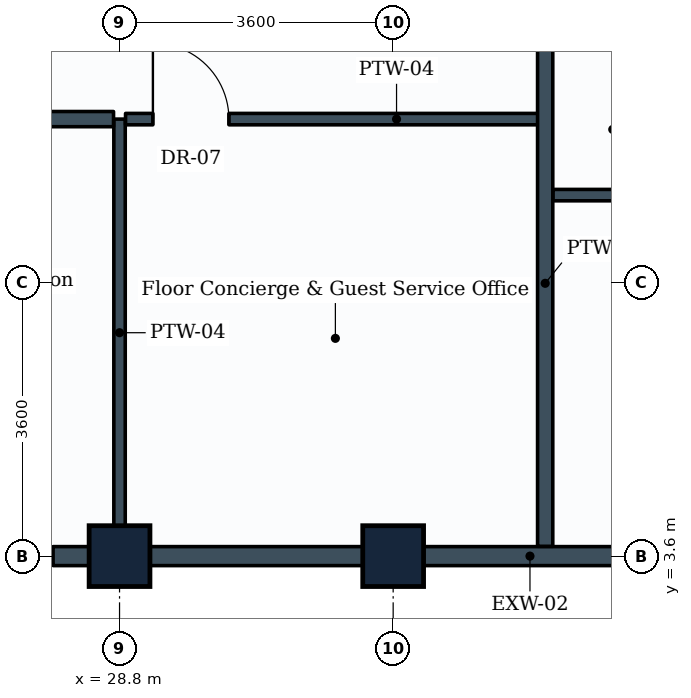
"""IFC4 building model, lengths in metres.
Left out: names, types, materials, properties, quantities, classifications, styles, units other than length and angle.
Written with IfcOpenShell. Run it as: python <this file> out.ifc"""

import sys

from ifc_helpers import new_model, si_unit, direction, frame, frame_2d, origin, origin_2d, place, context, subcontext, project, spatial, rectangle, extrude, element, fill, save


model = new_model("IFC4")
c1 = context("Model", 3, precision=1e-05, world=origin(), true_north=direction((0.0, 1.0)))
c2 = subcontext(c1, "Body", "Model", "MODEL_VIEW")
j1 = project(units=[si_unit("LENGTHUNIT", "METRE"), si_unit("PLANEANGLEUNIT", "RADIAN")], contexts=[c1])
p1 = place(None, origin())
s1 = spatial("IfcSite", under=j1, at=p1, CompositionType="ELEMENT")
p2 = place(p1, origin())
s2 = spatial("IfcBuilding", under=s1, at=p2, CompositionType="ELEMENT")
p3 = place(p2, frame((0.0, 0.0, 281.0)))
s3 = spatial("IfcBuildingStorey", under=s2, at=p3, CompositionType="ELEMENT", Elevation=281.0)
for number, where, z_axis, x_axis in (
    (1, (28.8, 3.6, 0.0), (0.0, 0.0, 1.0), (1.0, 0.0, 0.0)),
    (2, (32.4, 3.6, 0.0), (0.0, 0.0, 1.0), (1.0, 0.0, 0.0)),
):
    element("IfcColumn", number, at=place(p3, frame(where, z_axis=z_axis, x_axis=x_axis)), inside=s3, PredefinedType="COLUMN", context=c2, shape_type="SweptSolid", body=[
        extrude(rectangle(XDim=0.8, YDim=0.8, at=origin_2d()), origin(), (0.0, 0.0, 1.0), 3.6),
    ])
p4 = place(p3, frame((28.8, 3.6, 0.0), z_axis=(0.0, 0.0, 1.0), x_axis=(-1.0, 0.0, 0.0)))
e3 = element("IfcWall", 3, at=p4, inside=s3, PredefinedType="STANDARD", context=c2, shape_type="SweptSolid", body=[
    extrude(rectangle(XDim=3.6, YDim=0.25, at=frame_2d((1.8, 0.0))), origin(), (0.0, 0.0, 1.0), 2.83),
])
p5 = place(p4, frame((0.875, 0.0, 0.85)))
e4 = element("IfcOpeningElement", 4, at=p5, cuts=e3, PredefinedType="OPENING", context=c2, shape_type="SweptSolid", body=[
    extrude(rectangle(XDim=1.8, YDim=1.35, at=frame_2d((0.9, 0.675))), frame((0.0, 0.135, 0.0), z_axis=(0.0, -1.0, 0.0), x_axis=(1.0, 0.0, 0.0)), (0.0, 0.0, 1.0), 0.27),
])
p6 = place(p3, frame((32.4, 3.6, 0.0), z_axis=(0.0, 0.0, 1.0), x_axis=(-1.0, 0.0, 0.0)))
e5 = element("IfcWall", 5, at=p6, inside=s3, PredefinedType="STANDARD", context=c2, shape_type="SweptSolid", body=[
    extrude(rectangle(XDim=3.6, YDim=0.25, at=frame_2d((1.8, 0.0))), origin(), (0.0, 0.0, 1.0), 2.83),
])
p7 = place(p3, frame((36.0, 3.6, 0.0), z_axis=(0.0, 0.0, 1.0), x_axis=(-1.0, 0.0, 0.0)))
e6 = element("IfcWall", 6, at=p7, inside=s3, PredefinedType="STANDARD", context=c2, shape_type="SweptSolid", body=[
    extrude(rectangle(XDim=3.6, YDim=0.25, at=frame_2d((1.8, 0.0))), origin(), (0.0, 0.0, 1.0), 2.83),
])
p8 = place(p3, frame((28.8, 9.35, 0.0), z_axis=(0.0, 0.0, 1.0), x_axis=(0.0, -1.0, 0.0)))
e7 = element("IfcWall", 7, at=p8, inside=s3, PredefinedType="PARTITIONING", context=c2, shape_type="SweptSolid", body=[
    extrude(rectangle(XDim=5.621, YDim=0.15, at=frame_2d((2.811, 0.0))), origin(), (0.0, 0.0, 1.0), 3.335),
])
p9 = place(p3, frame((13.13, 9.35, 0.0), z_axis=(0.0, 0.0, 1.0), x_axis=(1.0, 0.0, 0.0)))
e8 = element("IfcWall", 8, at=p9, inside=s3, PredefinedType="PARTITIONING", context=c2, shape_type="SweptSolid", body=[
    extrude(rectangle(XDim=15.591, YDim=0.2, at=frame_2d((7.795, 0.0))), origin(), (0.0, 0.0, 1.0), 3.02),
])
p10 = place(p3, frame((28.879, 9.35, 0.0), z_axis=(0.0, 0.0, 1.0), x_axis=(1.0, 0.0, 0.0)))
e9 = element("IfcWall", 9, at=p10, inside=s3, PredefinedType="PARTITIONING", context=c2, shape_type="SweptSolid", body=[
    extrude(rectangle(XDim=5.521, YDim=0.15, at=frame_2d((2.76, 0.0))), origin(), (0.0, 0.0, 1.0), 3.335),
])
p11 = place(p10, frame((0.36, 0.0, 0.0)))
e10 = element("IfcOpeningElement", 10, at=p11, cuts=e9, PredefinedType="OPENING", context=c2, shape_type="SweptSolid", body=[
    extrude(rectangle(XDim=1.0, YDim=2.1, at=frame_2d((0.5, 1.05))), frame((0.0, 0.085, 0.0), z_axis=(0.0, -1.0, 0.0), x_axis=(1.0, 0.0, 0.0)), (0.0, 0.0, 1.0), 0.17),
])
p12 = place(p3, frame((34.4, 3.729, 0.0), z_axis=(0.0, 0.0, 1.0), x_axis=(0.0, 1.0, 0.0)))
e11 = element("IfcWall", 11, at=p12, inside=s3, PredefinedType="PARTITIONING", context=c2, shape_type="SweptSolid", body=[
    extrude(rectangle(XDim=6.921, YDim=0.2, at=frame_2d((3.46, 0.0))), origin(), (0.0, 0.0, 1.0), 2.83),
])
p13 = place(p3, frame((34.504, 8.35, 0.0), z_axis=(0.0, 0.0, 1.0), x_axis=(1.0, 0.0, 0.0)))
e12 = element("IfcWall", 12, at=p13, inside=s3, PredefinedType="PARTITIONING", context=c2, shape_type="SweptSolid", body=[
    extrude(rectangle(XDim=2.167, YDim=0.15, at=frame_2d((1.083, 0.0))), origin(), (0.0, 0.0, 1.0), 3.02),
])
p14 = place(p5, origin())
e13 = element("IfcWindow", 13, at=p14, inside=s3, PartitioningType="SINGLE_PANEL", PredefinedType="WINDOW", context=c2, shape_type="SweptSolid", body=[
    extrude(rectangle(XDim=1.8, YDim=1.35, at=frame_2d((0.9, 0.675))), frame((0.0, 0.03, 0.0), z_axis=(0.0, -1.0, 0.0), x_axis=(1.0, 0.0, 0.0)), (0.0, 0.0, 1.0), 0.06),
])
fill(e4, e13)
p15 = place(p11, origin())
e14 = element("IfcDoor", 14, at=p15, inside=s3, OperationType="SINGLE_SWING_LEFT", PredefinedType="DOOR", context=c2, shape_type="SweptSolid", body=[
    extrude(rectangle(XDim=1.0, YDim=2.1, at=frame_2d((0.5, 1.05))), frame((0.0, 0.025, 0.0), z_axis=(0.0, -1.0, 0.0), x_axis=(1.0, 0.0, 0.0)), (0.0, 0.0, 1.0), 0.05),
])
fill(e10, e14)
save(model, sys.argv[1])
